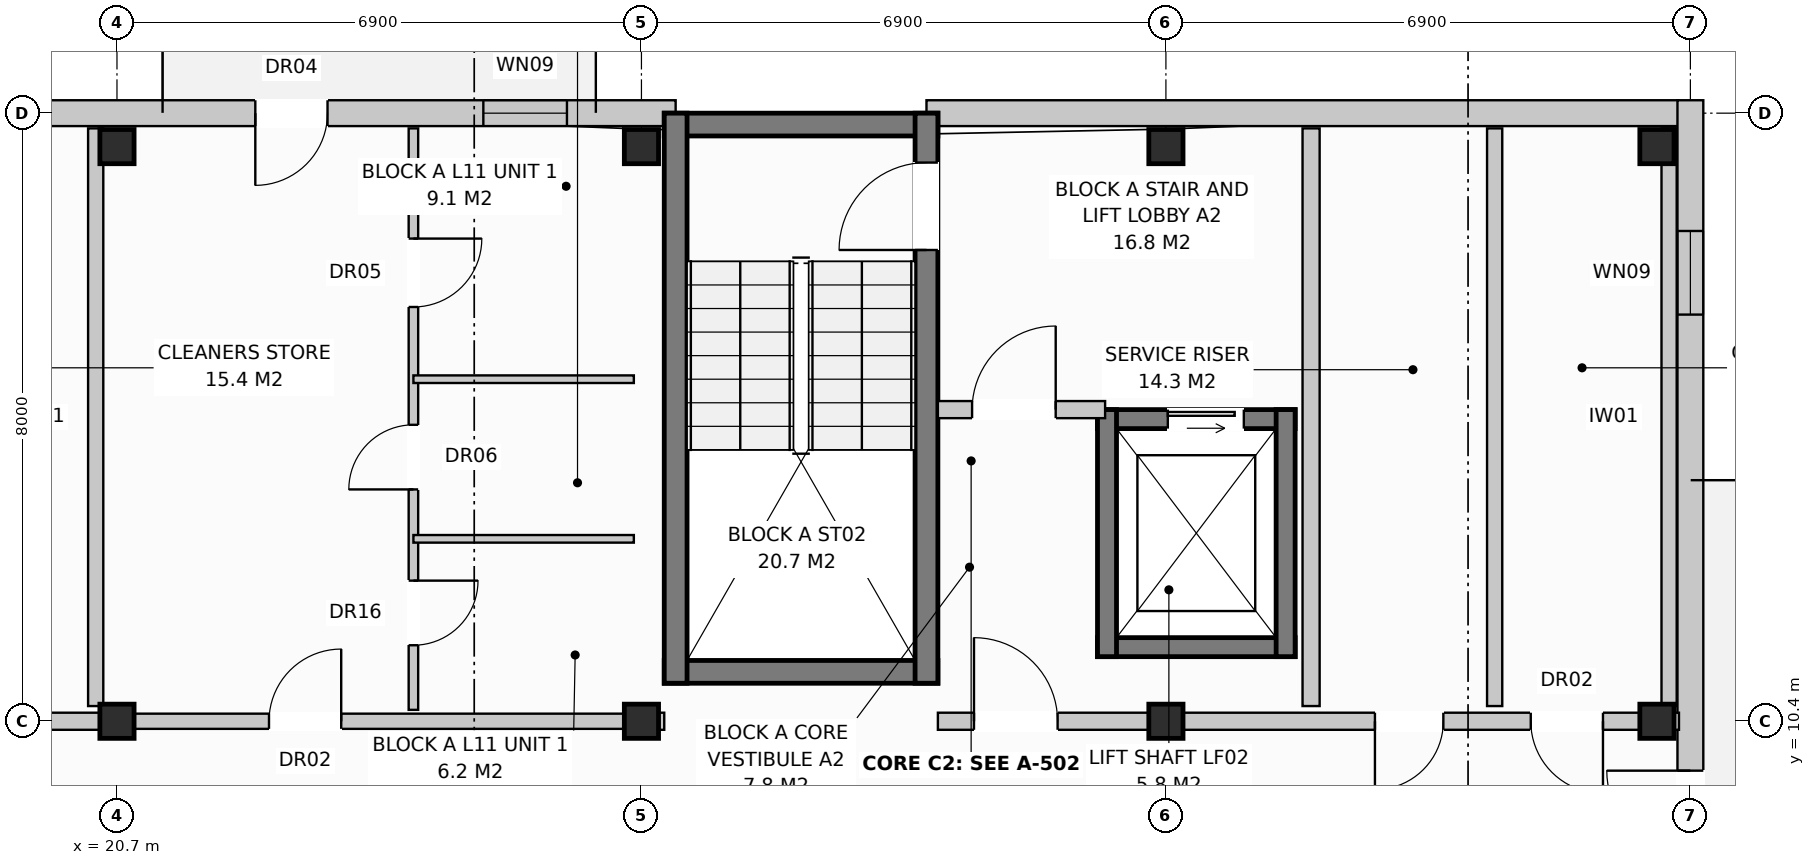
"""IFC4 building model, lengths in metres.
Left out: names, types, materials, properties, quantities, classifications, styles, units other than length and angle.
Written with IfcOpenShell. Run it as: python <this file> out.ifc"""

import sys

from ifc_helpers import new_model, si_unit, direction, frame, frame_2d, origin, origin_with_axes, origin_2d, place, context, subcontext, project, spatial, rectangle, extrude, element, fill, save


model = new_model("IFC4")
c1 = context("Model", 3, precision=1e-05, world=origin(), true_north=direction((0.0, 1.0)))
c2 = subcontext(c1, "Body", "Model", "MODEL_VIEW")
j1 = project(units=[si_unit("LENGTHUNIT", "METRE"), si_unit("PLANEANGLEUNIT", "RADIAN")], contexts=[c1])
p1 = place(None, origin())
s1 = spatial("IfcSite", under=j1, at=p1, CompositionType="ELEMENT")
p2 = place(p1, origin())
s2 = spatial("IfcBuilding", under=s1, at=p2, CompositionType="ELEMENT")
p3 = place(p2, frame((0.0, 0.0, 36.8)))
s3 = spatial("IfcBuildingStorey", under=s2, at=p3, CompositionType="ELEMENT", Elevation=36.8)
for number, where, z_axis, x_axis in (
    (1, (20.7, 10.4, 0.0), (0.0, 0.0, 1.0), (1.0, 0.0, 0.0)),
    (2, (20.7, 17.96, 0.0), (0.0, 0.0, 1.0), (1.0, 0.0, 0.0)),
    (3, (27.6, 10.4, 0.0), (0.0, 0.0, 1.0), (1.0, 0.0, 0.0)),
    (4, (27.6, 17.96, 0.0), (0.0, 0.0, 1.0), (1.0, 0.0, 0.0)),
    (5, (34.5, 10.4, 0.0), (0.0, 0.0, 1.0), (1.0, 0.0, 0.0)),
    (6, (34.5, 17.96, 0.0), (0.0, 0.0, 1.0), (1.0, 0.0, 0.0)),
    (7, (40.96, 10.4, 0.0), (0.0, 0.0, 1.0), (1.0, 0.0, 0.0)),
    (8, (40.96, 17.96, 0.0), (0.0, 0.0, 1.0), (1.0, 0.0, 0.0)),
):
    element("IfcColumn", number, at=place(p3, frame(where, z_axis=z_axis, x_axis=x_axis)), inside=s3, PredefinedType="COLUMN", context=c2, shape_type="SweptSolid", body=[
        extrude(rectangle(XDim=0.45, YDim=0.45, at=origin_2d()), origin(), (0.0, 0.0, 1.0), 3.2),
    ])
p4 = place(p3, frame((10.65, 18.4, 0.0), z_axis=(0.0, 0.0, 1.0), x_axis=(1.0, 0.0, 0.0)))
e9 = element("IfcWall", 9, at=p4, inside=s3, PredefinedType="STANDARD", context=c2, shape_type="SweptSolid", body=[
    extrude(rectangle(XDim=17.4, YDim=0.34, at=frame_2d((8.7, 0.0))), origin(), (0.0, 0.0, 1.0), 2.97),
])
p5 = place(p4, frame((11.87, 0.0, 0.0)))
e10 = element("IfcOpeningElement", 10, at=p5, cuts=e9, PredefinedType="OPENING", context=c2, shape_type="SweptSolid", body=[
    extrude(rectangle(XDim=0.95, YDim=2.1, at=frame_2d((0.475, 1.05))), frame((0.0, 0.182, 0.0), z_axis=(0.0, -1.0, 0.0), x_axis=(1.0, 0.0, 0.0)), (0.0, 0.0, 1.0), 0.364),
])
p6 = place(p4, frame((14.87, 0.0, 0.72)))
e11 = element("IfcOpeningElement", 11, at=p6, cuts=e9, PredefinedType="OPENING", context=c2, shape_type="SweptSolid", body=[
    extrude(rectangle(XDim=1.1, YDim=1.5, at=frame_2d((0.55, 0.75))), frame((0.0, 0.182, 0.0), z_axis=(0.0, -1.0, 0.0), x_axis=(1.0, 0.0, 0.0)), (0.0, 0.0, 1.0), 0.364),
])
p7 = place(p3, frame((31.35, 18.4, 0.0), z_axis=(0.0, 0.0, 1.0), x_axis=(1.0, 0.0, 0.0)))
e12 = element("IfcWall", 12, at=p7, inside=s3, PredefinedType="STANDARD", context=c2, shape_type="SweptSolid", body=[
    extrude(rectangle(XDim=9.89, YDim=0.34, at=frame_2d((4.945, 0.0))), origin(), (0.0, 0.0, 1.0), 2.97),
])
p8 = place(p3, frame((41.4, -0.17, 0.0), z_axis=(0.0, 0.0, 1.0), x_axis=(0.0, 1.0, 0.0)))
e13 = element("IfcWall", 13, at=p8, inside=s3, PredefinedType="STANDARD", context=c2, shape_type="SweptSolid", body=[
    extrude(rectangle(XDim=18.74, YDim=0.34, at=frame_2d((9.37, 0.0))), origin(), (0.0, 0.0, 1.0), 2.97),
])
p9 = place(p8, frame((8.82, 0.0, 0.0)))
e14 = element("IfcOpeningElement", 14, at=p9, cuts=e13, PredefinedType="OPENING", context=c2, shape_type="SweptSolid", body=[
    extrude(rectangle(XDim=1.1, YDim=2.1, at=frame_2d((0.55, 1.05))), frame((0.0, 0.182, 0.0), z_axis=(0.0, -1.0, 0.0), x_axis=(1.0, 0.0, 0.0)), (0.0, 0.0, 1.0), 0.364),
])
p10 = place(p8, frame((1.72, 0.0, 0.72)))
e15 = element("IfcOpeningElement", 15, at=p10, cuts=e13, PredefinedType="OPENING", context=c2, shape_type="SweptSolid", body=[
    extrude(rectangle(XDim=1.1, YDim=1.5, at=frame_2d((0.55, 0.75))), frame((0.0, 0.182, 0.0), z_axis=(0.0, -1.0, 0.0), x_axis=(1.0, 0.0, 0.0)), (0.0, 0.0, 1.0), 0.364),
])
p11 = place(p8, frame((15.92, 0.0, 0.72)))
e16 = element("IfcOpeningElement", 16, at=p11, cuts=e13, PredefinedType="OPENING", context=c2, shape_type="SweptSolid", body=[
    extrude(rectangle(XDim=1.1, YDim=1.5, at=frame_2d((0.55, 0.75))), frame((0.0, 0.182, 0.0), z_axis=(0.0, -1.0, 0.0), x_axis=(1.0, 0.0, 0.0)), (0.0, 0.0, 1.0), 0.364),
])
p12 = place(p3, frame((20.42, 10.6, 0.0), z_axis=(0.0, 0.0, 1.0), x_axis=(0.0, 1.0, 0.0)))
e17 = element("IfcWall", 17, at=p12, inside=s3, PredefinedType="PARTITIONING", context=c2, shape_type="SweptSolid", body=[
    extrude(rectangle(XDim=7.6, YDim=0.2, at=frame_2d((3.8, 0.0))), origin(), (0.0, 0.0, 1.0), 2.97),
])
p13 = place(p3, frame((10.8, 10.4, 0.0), z_axis=(0.0, 0.0, 1.0), x_axis=(1.0, 0.0, 0.0)))
e18 = element("IfcWall", 18, at=p13, inside=s3, PredefinedType="PARTITIONING", context=c2, shape_type="SweptSolid", body=[
    extrude(rectangle(XDim=9.9, YDim=0.225, at=frame_2d((4.95, 0.0))), origin(), (0.0, 0.0, 1.0), 2.41),
])
p14 = place(p13, frame((0.475, 0.0, 0.0)))
e19 = element("IfcOpeningElement", 19, at=p14, cuts=e18, PredefinedType="OPENING", context=c2, shape_type="SweptSolid", body=[
    extrude(rectangle(XDim=1.1, YDim=2.15, at=frame_2d((0.55, 1.075))), frame((0.0, 0.125, 0.0), z_axis=(0.0, -1.0, 0.0), x_axis=(1.0, 0.0, 0.0)), (0.0, 0.0, 1.0), 0.249),
])
p15 = place(p13, frame((5.75, 0.0, 0.0)))
e20 = element("IfcOpeningElement", 20, at=p15, cuts=e18, PredefinedType="OPENING", context=c2, shape_type="SweptSolid", body=[
    extrude(rectangle(XDim=0.9, YDim=2.1, at=frame_2d((0.45, 1.05))), frame((0.0, 0.125, 0.0), z_axis=(0.0, -1.0, 0.0), x_axis=(1.0, 0.0, 0.0)), (0.0, 0.0, 1.0), 0.249),
])
p16 = place(p13, frame((7.8, 0.0, 0.0)))
e21 = element("IfcOpeningElement", 21, at=p16, cuts=e18, PredefinedType="OPENING", context=c2, shape_type="SweptSolid", body=[
    extrude(rectangle(XDim=0.95, YDim=2.15, at=frame_2d((0.475, 1.075))), frame((0.0, 0.125, 0.0), z_axis=(0.0, -1.0, 0.0), x_axis=(1.0, 0.0, 0.0)), (0.0, 0.0, 1.0), 0.249),
])
for number, where, z_axis, x_axis in (
    (22, (27.9, 18.25, 0.0), (0.0, 0.0, 1.0), (1.0, 0.0, 0.0)),
    (23, (27.9, 11.05, 0.0), (0.0, 0.0, 1.0), (1.0, 0.0, 0.0)),
):
    element("IfcWall", number, at=place(p3, frame(where, z_axis=z_axis, x_axis=x_axis)), inside=s3, PredefinedType="SHEAR", context=c2, shape_type="SweptSolid", body=[
        extrude(rectangle(XDim=3.6, YDim=0.3, at=frame_2d((1.8, 0.0))), origin(), (0.0, 0.0, 1.0), 2.97),
    ])
p17 = place(p3, frame((28.05, 10.9, 0.0), z_axis=(0.0, 0.0, 1.0), x_axis=(0.0, 1.0, 0.0)))
e24 = element("IfcWall", 24, at=p17, inside=s3, PredefinedType="SHEAR", context=c2, shape_type="SweptSolid", body=[
    extrude(rectangle(XDim=7.5, YDim=0.3, at=frame_2d((3.75, 0.0))), origin(), (0.0, 0.0, 1.0), 2.97),
])
p18 = place(p3, frame((31.35, 10.9, 0.0), z_axis=(0.0, 0.0, 1.0), x_axis=(0.0, 1.0, 0.0)))
e25 = element("IfcWall", 25, at=p18, inside=s3, PredefinedType="SHEAR", context=c2, shape_type="SweptSolid", body=[
    extrude(rectangle(XDim=7.5, YDim=0.3, at=frame_2d((3.75, 0.0))), origin(), (0.0, 0.0, 1.0), 2.97),
])
p19 = place(p18, frame((5.7, 0.0, 0.0)))
e26 = element("IfcOpeningElement", 26, at=p19, cuts=e25, PredefinedType="OPENING", context=c2, shape_type="SweptSolid", body=[
    extrude(rectangle(XDim=1.15, YDim=2.15, at=frame_2d((0.575, 1.075))), frame((0.0, 0.162, 0.0), z_axis=(0.0, -1.0, 0.0), x_axis=(1.0, 0.0, 0.0)), (0.0, 0.0, 1.0), 0.324),
])
p20 = place(p3, frame((33.6, 14.375, 0.0), z_axis=(0.0, 0.0, 1.0), x_axis=(1.0, 0.0, 0.0)))
e27 = element("IfcWall", 27, at=p20, inside=s3, PredefinedType="SHEAR", context=c2, shape_type="SweptSolid", body=[
    extrude(rectangle(XDim=2.6, YDim=0.25, at=frame_2d((1.3, 0.0))), origin(), (0.0, 0.0, 1.0), 2.97),
])
p21 = place(p20, frame((0.925, 0.0, 0.0)))
e28 = element("IfcOpeningElement", 28, at=p21, cuts=e27, PredefinedType="OPENING", context=c2, shape_type="SweptSolid", body=[
    extrude(rectangle(XDim=1.0, YDim=2.1, at=frame_2d((0.5, 1.05))), frame((0.0, 0.137, 0.0), z_axis=(0.0, -1.0, 0.0), x_axis=(1.0, 0.0, 0.0)), (0.0, 0.0, 1.0), 0.274),
])
p22 = place(p3, frame((33.6, 11.375, 0.0), z_axis=(0.0, 0.0, 1.0), x_axis=(1.0, 0.0, 0.0)))
e29 = element("IfcWall", 29, at=p22, inside=s3, PredefinedType="SHEAR", context=c2, shape_type="SweptSolid", body=[
    extrude(rectangle(XDim=2.6, YDim=0.25, at=frame_2d((1.3, 0.0))), origin(), (0.0, 0.0, 1.0), 2.97),
])
for number, where, z_axis, x_axis in (
    (30, (33.725, 11.25, 0.0), (0.0, 0.0, 1.0), (0.0, 1.0, 0.0)),
    (31, (36.075, 11.25, 0.0), (0.0, 0.0, 1.0), (0.0, 1.0, 0.0)),
):
    element("IfcWall", number, at=place(p3, frame(where, z_axis=z_axis, x_axis=x_axis)), inside=s3, PredefinedType="SHEAR", context=c2, shape_type="SweptSolid", body=[
        extrude(rectangle(XDim=3.25, YDim=0.25, at=frame_2d((1.625, 0.0))), origin(), (0.0, 0.0, 1.0), 2.97),
    ])
p23 = place(p3, frame((36.41, 10.6, 0.0), z_axis=(0.0, 0.0, 1.0), x_axis=(0.0, 1.0, 0.0)))
e32 = element("IfcWall", 32, at=p23, inside=s3, PredefinedType="PARTITIONING", context=c2, shape_type="SweptSolid", body=[
    extrude(rectangle(XDim=7.6, YDim=0.225, at=frame_2d((3.8, 0.0))), origin(), (0.0, 0.0, 1.0), 2.59),
])
p24 = place(p3, frame((31.5, 14.5, 0.0), z_axis=(0.0, 0.0, 1.0), x_axis=(1.0, 0.0, 0.0)))
e33 = element("IfcWall", 33, at=p24, inside=s3, PredefinedType="PARTITIONING", context=c2, shape_type="SweptSolid", body=[
    extrude(rectangle(XDim=2.2, YDim=0.225, at=frame_2d((1.1, 0.0))), origin(), (0.0, 0.0, 1.0), 2.97),
])
p25 = place(p24, frame((0.45, 0.0, 0.0)))
e34 = element("IfcOpeningElement", 34, at=p25, cuts=e33, PredefinedType="OPENING", context=c2, shape_type="SweptSolid", body=[
    extrude(rectangle(XDim=1.1, YDim=2.15, at=frame_2d((0.55, 1.075))), frame((0.0, 0.125, 0.0), z_axis=(0.0, -1.0, 0.0), x_axis=(1.0, 0.0, 0.0)), (0.0, 0.0, 1.0), 0.249),
])
p26 = place(p3, frame((27.6, 10.4, 0.0), z_axis=(0.0, 0.0, 1.0), x_axis=(1.0, 0.0, 0.0)))
e35 = element("IfcWall", 35, at=p26, inside=s3, PredefinedType="PARTITIONING", context=c2, shape_type="SweptSolid", body=[
    extrude(rectangle(XDim=0.3, YDim=0.225, at=frame_2d((0.15, 0.0))), origin(), (0.0, 0.0, 1.0), 2.97),
])
p27 = place(p3, frame((38.825, 10.6, 0.0), z_axis=(0.0, 0.0, 1.0), x_axis=(0.0, 1.0, 0.0)))
e36 = element("IfcWall", 36, at=p27, inside=s3, PredefinedType="PARTITIONING", context=c2, shape_type="SweptSolid", body=[
    extrude(rectangle(XDim=7.6, YDim=0.2, at=frame_2d((3.8, 0.0))), origin(), (0.0, 0.0, 1.0), 2.59),
])
p28 = place(p3, frame((41.12, 10.6, 0.0), z_axis=(0.0, 0.0, 1.0), x_axis=(0.0, 1.0, 0.0)))
e37 = element("IfcWall", 37, at=p28, inside=s3, PredefinedType="PARTITIONING", context=c2, shape_type="SweptSolid", body=[
    extrude(rectangle(XDim=7.6, YDim=0.2, at=frame_2d((3.8, 0.0))), origin(), (0.0, 0.0, 1.0), 2.41),
])
p29 = place(p3, frame((31.5, 10.4, 0.0), z_axis=(0.0, 0.0, 1.0), x_axis=(1.0, 0.0, 0.0)))
e38 = element("IfcWall", 38, at=p29, inside=s3, PredefinedType="PARTITIONING", context=c2, shape_type="SweptSolid", body=[
    extrude(rectangle(XDim=9.75, YDim=0.225, at=frame_2d((4.875, 0.0))), origin(), (0.0, 0.0, 1.0), 2.41),
])
p30 = place(p29, frame((0.475, 0.0, 0.0)))
e39 = element("IfcOpeningElement", 39, at=p30, cuts=e38, PredefinedType="OPENING", context=c2, shape_type="SweptSolid", body=[
    extrude(rectangle(XDim=1.1, YDim=2.15, at=frame_2d((0.55, 1.075))), frame((0.0, 0.125, 0.0), z_axis=(0.0, -1.0, 0.0), x_axis=(1.0, 0.0, 0.0)), (0.0, 0.0, 1.0), 0.249),
])
p31 = place(p29, frame((5.75, 0.0, 0.0)))
e40 = element("IfcOpeningElement", 40, at=p31, cuts=e38, PredefinedType="OPENING", context=c2, shape_type="SweptSolid", body=[
    extrude(rectangle(XDim=0.9, YDim=2.1, at=frame_2d((0.45, 1.05))), frame((0.0, 0.125, 0.0), z_axis=(0.0, -1.0, 0.0), x_axis=(1.0, 0.0, 0.0)), (0.0, 0.0, 1.0), 0.249),
])
p32 = place(p29, frame((7.8, 0.0, 0.0)))
e41 = element("IfcOpeningElement", 41, at=p32, cuts=e38, PredefinedType="OPENING", context=c2, shape_type="SweptSolid", body=[
    extrude(rectangle(XDim=0.95, YDim=2.15, at=frame_2d((0.475, 1.075))), frame((0.0, 0.125, 0.0), z_axis=(0.0, -1.0, 0.0), x_axis=(1.0, 0.0, 0.0)), (0.0, 0.0, 1.0), 0.249),
])
p33 = place(p3, frame((20.7, 10.4, 0.0), z_axis=(0.0, 0.0, 1.0), x_axis=(1.0, 0.0, 0.0)))
e42 = element("IfcWall", 42, at=p33, inside=s3, PredefinedType="PARTITIONING", context=c2, shape_type="SweptSolid", body=[
    extrude(rectangle(XDim=6.9, YDim=0.2, at=frame_2d((3.45, 0.0))), origin(), (0.0, 0.0, 1.0), 2.41),
])
p34 = place(p33, frame((2.0, 0.0, 0.0)))
e43 = element("IfcOpeningElement", 43, at=p34, cuts=e42, PredefinedType="OPENING", context=c2, shape_type="SweptSolid", body=[
    extrude(rectangle(XDim=0.95, YDim=2.15, at=frame_2d((0.475, 1.075))), frame((0.0, 0.112, 0.0), z_axis=(0.0, -1.0, 0.0), x_axis=(1.0, 0.0, 0.0)), (0.0, 0.0, 1.0), 0.224),
])
p35 = place(p3, frame((24.6, 10.55, 0.0), z_axis=(0.0, 0.0, 1.0), x_axis=(0.0, 1.0, 0.0)))
e44 = element("IfcWall", 44, at=p35, inside=s3, PredefinedType="PARTITIONING", context=c2, shape_type="SweptSolid", body=[
    extrude(rectangle(XDim=7.65, YDim=0.125, at=frame_2d((3.825, 0.0))), origin(), (0.0, 0.0, 1.0), 2.97),
])
p36 = place(p35, frame((0.85, 0.0, 0.0)))
e45 = element("IfcOpeningElement", 45, at=p36, cuts=e44, PredefinedType="OPENING", context=c2, shape_type="SweptSolid", body=[
    extrude(rectangle(XDim=0.85, YDim=2.1, at=frame_2d((0.425, 1.05))), frame((0.0, 0.074, 0.0), z_axis=(0.0, -1.0, 0.0), x_axis=(1.0, 0.0, 0.0)), (0.0, 0.0, 1.0), 0.149),
])
p37 = place(p35, frame((2.9, 0.0, 0.0)))
e46 = element("IfcOpeningElement", 46, at=p37, cuts=e44, PredefinedType="OPENING", context=c2, shape_type="SweptSolid", body=[
    extrude(rectangle(XDim=0.85, YDim=2.05, at=frame_2d((0.425, 1.025))), frame((0.0, 0.074, 0.0), z_axis=(0.0, -1.0, 0.0), x_axis=(1.0, 0.0, 0.0)), (0.0, 0.0, 1.0), 0.149),
])
p38 = place(p35, frame((5.3, 0.0, 0.0)))
e47 = element("IfcOpeningElement", 47, at=p38, cuts=e44, PredefinedType="OPENING", context=c2, shape_type="SweptSolid", body=[
    extrude(rectangle(XDim=0.9, YDim=2.1, at=frame_2d((0.45, 1.05))), frame((0.0, 0.074, 0.0), z_axis=(0.0, -1.0, 0.0), x_axis=(1.0, 0.0, 0.0)), (0.0, 0.0, 1.0), 0.149),
])
for number, where, z_axis, x_axis in (
    (48, (24.6, 12.8, 0.0), (0.0, 0.0, 1.0), (1.0, 0.0, 0.0)),
    (49, (24.6, 14.9, 0.0), (0.0, 0.0, 1.0), (1.0, 0.0, 0.0)),
):
    element("IfcWall", number, at=place(p3, frame(where, z_axis=z_axis, x_axis=x_axis)), inside=s3, PredefinedType="PARTITIONING", context=c2, shape_type="SweptSolid", body=[
        extrude(rectangle(XDim=2.9, YDim=0.1, at=frame_2d((1.45, 0.0))), origin(), (0.0, 0.0, 1.0), 2.97),
    ])
p39 = place(p5, frame((0.95, 0.0, 0.0), z_axis=(0.0, 0.0, 1.0), x_axis=(-1.0, 0.0, 0.0)))
e50 = element("IfcDoor", 50, at=p39, inside=s3, OperationType="SINGLE_SWING_LEFT", PredefinedType="DOOR", context=c2, shape_type="SweptSolid", body=[
    extrude(rectangle(XDim=0.95, YDim=2.1, at=frame_2d((0.475, 1.05))), frame((0.0, 0.025, 0.0), z_axis=(0.0, -1.0, 0.0), x_axis=(1.0, 0.0, 0.0)), (0.0, 0.0, 1.0), 0.05),
])
fill(e10, e50)
p40 = place(p6, origin_with_axes())
e51 = element("IfcWindow", 51, at=p40, inside=s3, PartitioningType="SINGLE_PANEL", PredefinedType="WINDOW", context=c2, shape_type="SweptSolid", body=[
    extrude(rectangle(XDim=1.1, YDim=1.5, at=frame_2d((0.55, 0.75))), frame((0.0, 0.03, 0.0), z_axis=(0.0, -1.0, 0.0), x_axis=(1.0, 0.0, 0.0)), (0.0, 0.0, 1.0), 0.06),
])
fill(e11, e51)
p41 = place(p9, origin_with_axes())
e52 = element("IfcDoor", 52, at=p41, inside=s3, OperationType="SINGLE_SWING_RIGHT", PredefinedType="DOOR", context=c2, shape_type="SweptSolid", body=[
    extrude(rectangle(XDim=1.1, YDim=2.1, at=frame_2d((0.55, 1.05))), frame((0.0, 0.025, 0.0), z_axis=(0.0, -1.0, 0.0), x_axis=(1.0, 0.0, 0.0)), (0.0, 0.0, 1.0), 0.05),
])
fill(e14, e52)
p42 = place(p11, origin_with_axes())
e53 = element("IfcWindow", 53, at=p42, inside=s3, PartitioningType="SINGLE_PANEL", PredefinedType="WINDOW", context=c2, shape_type="SweptSolid", body=[
    extrude(rectangle(XDim=1.1, YDim=1.5, at=frame_2d((0.55, 0.75))), frame((0.0, 0.03, 0.0), z_axis=(0.0, -1.0, 0.0), x_axis=(1.0, 0.0, 0.0)), (0.0, 0.0, 1.0), 0.06),
])
fill(e16, e53)
p43 = place(p19, origin_with_axes())
e54 = element("IfcDoor", 54, at=p43, inside=s3, OperationType="SINGLE_SWING_LEFT", PredefinedType="DOOR", context=c2, shape_type="SweptSolid", body=[
    extrude(rectangle(XDim=1.15, YDim=2.15, at=frame_2d((0.575, 1.075))), frame((0.0, 0.025, 0.0), z_axis=(0.0, -1.0, 0.0), x_axis=(1.0, 0.0, 0.0)), (0.0, 0.0, 1.0), 0.05),
])
fill(e26, e54)
p44 = place(p21, origin_with_axes())
e55 = element("IfcDoor", 55, at=p44, inside=s3, OperationType="SLIDING_TO_LEFT", PredefinedType="DOOR", context=c2, shape_type="SweptSolid", body=[
    extrude(rectangle(XDim=1.0, YDim=2.1, at=frame_2d((0.5, 1.05))), frame((0.0, 0.025, 0.0), z_axis=(0.0, -1.0, 0.0), x_axis=(1.0, 0.0, 0.0)), (0.0, 0.0, 1.0), 0.05),
])
fill(e28, e55)
p45 = place(p25, origin_with_axes())
e56 = element("IfcDoor", 56, at=p45, inside=s3, OperationType="SINGLE_SWING_RIGHT", PredefinedType="DOOR", context=c2, shape_type="SweptSolid", body=[
    extrude(rectangle(XDim=1.1, YDim=2.15, at=frame_2d((0.55, 1.075))), frame((0.0, 0.025, 0.0), z_axis=(0.0, -1.0, 0.0), x_axis=(1.0, 0.0, 0.0)), (0.0, 0.0, 1.0), 0.05),
])
fill(e34, e56)
p46 = place(p30, origin_with_axes())
e57 = element("IfcDoor", 57, at=p46, inside=s3, OperationType="SINGLE_SWING_LEFT", PredefinedType="DOOR", context=c2, shape_type="SweptSolid", body=[
    extrude(rectangle(XDim=1.1, YDim=2.15, at=frame_2d((0.55, 1.075))), frame((0.0, 0.025, 0.0), z_axis=(0.0, -1.0, 0.0), x_axis=(1.0, 0.0, 0.0)), (0.0, 0.0, 1.0), 0.05),
])
fill(e39, e57)
p47 = place(p31, frame((0.9, 0.0, 0.0), z_axis=(0.0, 0.0, 1.0), x_axis=(-1.0, 0.0, 0.0)))
e58 = element("IfcDoor", 58, at=p47, inside=s3, OperationType="SINGLE_SWING_LEFT", PredefinedType="DOOR", context=c2, shape_type="SweptSolid", body=[
    extrude(rectangle(XDim=0.9, YDim=2.1, at=frame_2d((0.45, 1.05))), frame((0.0, 0.025, 0.0), z_axis=(0.0, -1.0, 0.0), x_axis=(1.0, 0.0, 0.0)), (0.0, 0.0, 1.0), 0.05),
])
fill(e40, e58)
p48 = place(p32, frame((0.95, 0.0, 0.0), z_axis=(0.0, 0.0, 1.0), x_axis=(-1.0, 0.0, 0.0)))
e59 = element("IfcDoor", 59, at=p48, inside=s3, OperationType="SINGLE_SWING_RIGHT", PredefinedType="DOOR", context=c2, shape_type="SweptSolid", body=[
    extrude(rectangle(XDim=0.95, YDim=2.15, at=frame_2d((0.475, 1.075))), frame((0.0, 0.025, 0.0), z_axis=(0.0, -1.0, 0.0), x_axis=(1.0, 0.0, 0.0)), (0.0, 0.0, 1.0), 0.05),
])
fill(e41, e59)
p49 = place(p34, origin_with_axes())
e60 = element("IfcDoor", 60, at=p49, inside=s3, OperationType="SINGLE_SWING_RIGHT", PredefinedType="DOOR", context=c2, shape_type="SweptSolid", body=[
    extrude(rectangle(XDim=0.95, YDim=2.15, at=frame_2d((0.475, 1.075))), frame((0.0, 0.025, 0.0), z_axis=(0.0, -1.0, 0.0), x_axis=(1.0, 0.0, 0.0)), (0.0, 0.0, 1.0), 0.05),
])
fill(e43, e60)
p50 = place(p36, frame((0.85, 0.0, 0.0), z_axis=(0.0, 0.0, 1.0), x_axis=(-1.0, 0.0, 0.0)))
e61 = element("IfcDoor", 61, at=p50, inside=s3, OperationType="SINGLE_SWING_RIGHT", PredefinedType="DOOR", context=c2, shape_type="SweptSolid", body=[
    extrude(rectangle(XDim=0.85, YDim=2.1, at=frame_2d((0.425, 1.05))), frame((0.0, 0.025, 0.0), z_axis=(0.0, -1.0, 0.0), x_axis=(1.0, 0.0, 0.0)), (0.0, 0.0, 1.0), 0.05),
])
fill(e45, e61)
p51 = place(p37, origin_with_axes())
e62 = element("IfcDoor", 62, at=p51, inside=s3, OperationType="SINGLE_SWING_LEFT", PredefinedType="DOOR", context=c2, shape_type="SweptSolid", body=[
    extrude(rectangle(XDim=0.85, YDim=2.05, at=frame_2d((0.425, 1.025))), frame((0.0, 0.025, 0.0), z_axis=(0.0, -1.0, 0.0), x_axis=(1.0, 0.0, 0.0)), (0.0, 0.0, 1.0), 0.05),
])
fill(e46, e62)
p52 = place(p38, frame((0.9, 0.0, 0.0), z_axis=(0.0, 0.0, 1.0), x_axis=(-1.0, 0.0, 0.0)))
e63 = element("IfcDoor", 63, at=p52, inside=s3, OperationType="SINGLE_SWING_RIGHT", PredefinedType="DOOR", context=c2, shape_type="SweptSolid", body=[
    extrude(rectangle(XDim=0.9, YDim=2.1, at=frame_2d((0.45, 1.05))), frame((0.0, 0.025, 0.0), z_axis=(0.0, -1.0, 0.0), x_axis=(1.0, 0.0, 0.0)), (0.0, 0.0, 1.0), 0.05),
])
fill(e47, e63)
save(model, sys.argv[1])
